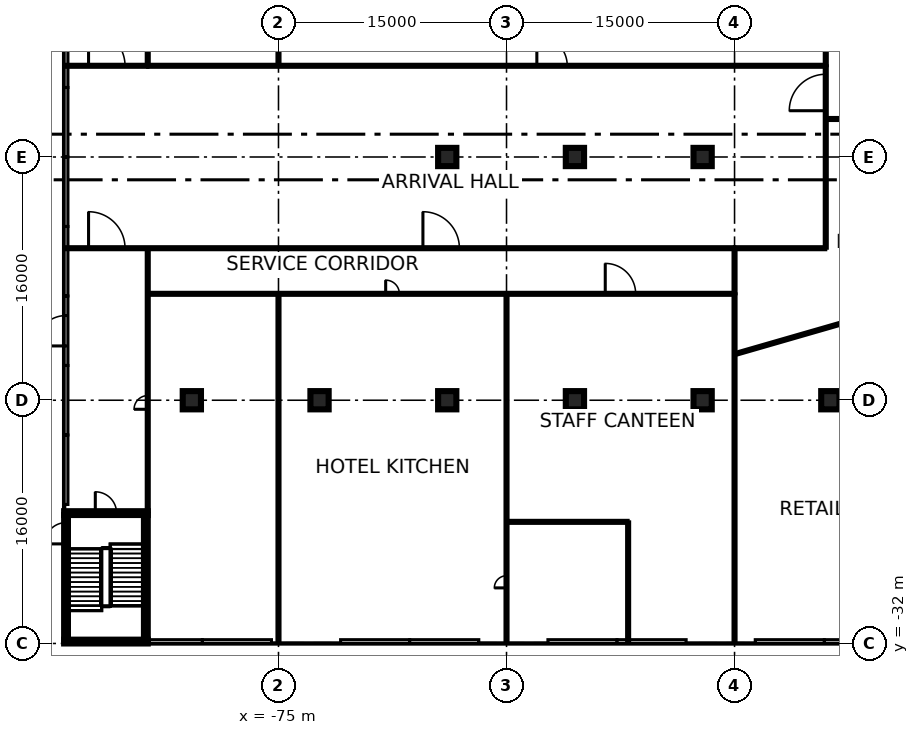
"""IFC4 building model, lengths in metres.
Left out: names, types, materials, properties, quantities, classifications, styles, units other than length and angle.
Written with IfcOpenShell. Run it as: python <this file> out.ifc"""

import sys

from ifc_helpers import new_model, si_unit, direction, frame, frame_2d, origin, origin_2d, place, context, subcontext, project, spatial, rectangle, extrude, element, fill, save


model = new_model("IFC4")
c1 = context("Model", 3, precision=1e-05, world=origin(), true_north=direction((0.0, 1.0)))
c2 = subcontext(c1, "Body", "Model", "MODEL_VIEW")
j1 = project(units=[si_unit("LENGTHUNIT", "METRE"), si_unit("PLANEANGLEUNIT", "RADIAN")], contexts=[c1])
p1 = place(None, origin())
s1 = spatial("IfcSite", under=j1, at=p1, CompositionType="ELEMENT")
p2 = place(p1, origin())
s2 = spatial("IfcBuilding", under=s1, at=p2, CompositionType="ELEMENT")
p3 = place(p2, origin())
s3 = spatial("IfcBuildingStorey", under=s2, at=p3, CompositionType="ELEMENT", Elevation=0.0)
for number, where, z_axis, x_axis in (
    (1, (-80.7, -16.0, -0.45), (0.0, 0.0, 1.0), (1.0, 0.0, 0.0)),
    (2, (-72.3, -16.0, -0.45), (0.0, 0.0, 1.0), (1.0, 0.0, 0.0)),
    (3, (-63.9, -16.0, -0.45), (0.0, 0.0, 1.0), (1.0, 0.0, 0.0)),
    (4, (-63.9, 0.0, -0.45), (0.0, 0.0, 1.0), (1.0, 0.0, 0.0)),
    (5, (-55.5, -16.0, -0.45), (0.0, 0.0, 1.0), (1.0, 0.0, 0.0)),
    (6, (-55.5, 0.0, -0.45), (0.0, 0.0, 1.0), (1.0, 0.0, 0.0)),
    (7, (-47.1, -16.0, -0.45), (0.0, 0.0, 1.0), (1.0, 0.0, 0.0)),
    (8, (-47.1, 0.0, -0.45), (0.0, 0.0, 1.0), (1.0, 0.0, 0.0)),
    (9, (-38.7, -16.0, -0.45), (0.0, 0.0, 1.0), (1.0, 0.0, 0.0)),
):
    element("IfcColumn", number, at=place(p3, frame(where, z_axis=z_axis, x_axis=x_axis)), inside=s3, PredefinedType="COLUMN", context=c2, shape_type="SweptSolid", body=[
        extrude(rectangle(XDim=1.2, YDim=1.2, at=origin_2d()), origin(), (0.0, 0.0, 1.0), 7.55),
    ])
p4 = place(p3, frame((-88.975, 4.572, 0.0), z_axis=(0.0, 0.0, 1.0), x_axis=(0.0, 1.0, 0.0)))
e10 = element("IfcWall", 10, at=p4, inside=s3, PredefinedType="SOLIDWALL", context=c2, shape_type="SweptSolid", body=[
    extrude(rectangle(XDim=4.571, YDim=0.25, at=frame_2d((2.286, 0.0))), origin(), (0.0, 0.0, 1.0), 7.1),
])
for number, where, z_axis, x_axis in (
    (11, (-88.975, 0.0, 0.0), (0.0, 0.0, 1.0), (0.0, 1.0, 0.0)),
    (12, (-88.975, -4.572, 0.0), (0.0, 0.0, 1.0), (0.0, 1.0, 0.0)),
):
    element("IfcWall", number, at=place(p3, frame(where, z_axis=z_axis, x_axis=x_axis)), inside=s3, PredefinedType="SOLIDWALL", context=c2, shape_type="SweptSolid", body=[
        extrude(rectangle(XDim=4.572, YDim=0.25, at=frame_2d((2.286, 0.0))), origin(), (0.0, 0.0, 1.0), 7.1),
    ])
p5 = place(p3, frame((-88.975, -9.143, 0.0), z_axis=(0.0, 0.0, 1.0), x_axis=(0.0, 1.0, 0.0)))
e13 = element("IfcWall", 13, at=p5, inside=s3, PredefinedType="SOLIDWALL", context=c2, shape_type="SweptSolid", body=[
    extrude(rectangle(XDim=4.571, YDim=0.25, at=frame_2d((2.286, 0.0))), origin(), (0.0, 0.0, 1.0), 7.1),
])
p6 = place(p3, frame((-88.975, -13.714, 0.0), z_axis=(0.0, 0.0, 1.0), x_axis=(0.0, 1.0, 0.0)))
e14 = element("IfcWall", 14, at=p6, inside=s3, PredefinedType="SOLIDWALL", context=c2, shape_type="SweptSolid", body=[
    extrude(rectangle(XDim=4.572, YDim=0.25, at=frame_2d((2.286, 0.0))), origin(), (0.0, 0.0, 1.0), 7.1),
])
p7 = place(p6, frame((1.286, 0.0, 0.0)))
e15 = element("IfcOpeningElement", 15, at=p7, cuts=e14, PredefinedType="OPENING", context=c2, shape_type="SweptSolid", body=[
    extrude(rectangle(XDim=2.0, YDim=2.4, at=frame_2d((1.0, 1.2))), frame((0.0, 0.135, 0.0), z_axis=(0.0, -1.0, 0.0), x_axis=(1.0, 0.0, 0.0)), (0.0, 0.0, 1.0), 0.27),
])
p8 = place(p3, frame((-88.975, -18.286, 0.0), z_axis=(0.0, 0.0, 1.0), x_axis=(0.0, 1.0, 0.0)))
e16 = element("IfcWall", 16, at=p8, inside=s3, PredefinedType="SOLIDWALL", context=c2, shape_type="SweptSolid", body=[
    extrude(rectangle(XDim=4.571, YDim=0.25, at=frame_2d((2.286, 0.0))), origin(), (0.0, 0.0, 1.0), 7.1),
])
p9 = place(p3, frame((-88.975, -22.857, 0.0), z_axis=(0.0, 0.0, 1.0), x_axis=(0.0, 1.0, 0.0)))
e17 = element("IfcWall", 17, at=p9, inside=s3, PredefinedType="SOLIDWALL", context=c2, shape_type="SweptSolid", body=[
    extrude(rectangle(XDim=4.572, YDim=0.25, at=frame_2d((2.286, 0.0))), origin(), (0.0, 0.0, 1.0), 7.1),
])
p10 = place(p3, frame((-80.008, -31.875, 0.0), z_axis=(0.0, 0.0, 1.0), x_axis=(-1.0, 0.0, 0.0)))
e18 = element("IfcWall", 18, at=p10, inside=s3, PredefinedType="SOLIDWALL", context=c2, shape_type="SweptSolid", body=[
    extrude(rectangle(XDim=3.592, YDim=0.25, at=frame_2d((1.796, 0.0))), origin(), (0.0, 0.0, 1.0), 7.1),
])
p11 = place(p3, frame((-75.461, -31.875, 0.0), z_axis=(0.0, 0.0, 1.0), x_axis=(-1.0, 0.0, 0.0)))
e19 = element("IfcWall", 19, at=p11, inside=s3, PredefinedType="SOLIDWALL", context=c2, shape_type="SweptSolid", body=[
    extrude(rectangle(XDim=4.546, YDim=0.25, at=frame_2d((2.273, 0.0))), origin(), (0.0, 0.0, 1.0), 7.1),
])
for number, where, z_axis, x_axis in (
    (20, (-66.369, -31.875, 0.0), (0.0, 0.0, 1.0), (-1.0, 0.0, 0.0)),
    (21, (-61.823, -31.875, 0.0), (0.0, 0.0, 1.0), (-1.0, 0.0, 0.0)),
    (22, (-52.731, -31.875, 0.0), (0.0, 0.0, 1.0), (-1.0, 0.0, 0.0)),
    (23, (-48.185, -31.875, 0.0), (0.0, 0.0, 1.0), (-1.0, 0.0, 0.0)),
    (24, (-39.092, -31.875, 0.0), (0.0, 0.0, 1.0), (-1.0, 0.0, 0.0)),
    (25, (-34.546, -31.875, 0.0), (0.0, 0.0, 1.0), (-1.0, 0.0, 0.0)),
):
    element("IfcWall", number, at=place(p3, frame(where, z_axis=z_axis, x_axis=x_axis)), inside=s3, PredefinedType="SOLIDWALL", context=c2, shape_type="SweptSolid", body=[
        extrude(rectangle(XDim=4.546, YDim=0.25, at=frame_2d((2.273, 0.0))), origin(), (0.0, 0.0, 1.0), 7.1),
    ])
p12 = place(p3, frame((-89.1, -31.875, 0.0), z_axis=(0.0, 0.0, 1.0), x_axis=(1.0, 0.0, 0.0)))
e26 = element("IfcWall", 26, at=p12, inside=s3, PredefinedType="SHEAR", context=c2, shape_type="SweptSolid", body=[
    extrude(rectangle(XDim=5.5, YDim=0.25, at=frame_2d((2.75, 0.0))), origin(), (0.0, 0.0, 1.0), 7.1),
])
p13 = place(p3, frame((-89.1, -23.425, 0.0), z_axis=(0.0, 0.0, 1.0), x_axis=(1.0, 0.0, 0.0)))
e27 = element("IfcWall", 27, at=p13, inside=s3, PredefinedType="SHEAR", context=c2, shape_type="SweptSolid", body=[
    extrude(rectangle(XDim=5.5, YDim=0.25, at=frame_2d((2.75, 0.0))), origin(), (0.0, 0.0, 1.0), 7.1),
])
p14 = place(p13, frame((2.05, 0.0, 0.0)))
e28 = element("IfcOpeningElement", 28, at=p14, cuts=e27, PredefinedType="OPENING", context=c2, shape_type="SweptSolid", body=[
    extrude(rectangle(XDim=1.4, YDim=2.1, at=frame_2d((0.7, 1.05))), frame((0.0, 0.135, 0.0), z_axis=(0.0, -1.0, 0.0), x_axis=(1.0, 0.0, 0.0)), (0.0, 0.0, 1.0), 0.27),
])
p15 = place(p3, frame((-88.975, -31.75, 0.0), z_axis=(0.0, 0.0, 1.0), x_axis=(0.0, 1.0, 0.0)))
e29 = element("IfcWall", 29, at=p15, inside=s3, PredefinedType="SHEAR", context=c2, shape_type="SweptSolid", body=[
    extrude(rectangle(XDim=8.2, YDim=0.25, at=frame_2d((4.1, 0.0))), origin(), (0.0, 0.0, 1.0), 7.1),
])
p16 = place(p15, frame((6.3, 0.0, 0.0)))
e30 = element("IfcOpeningElement", 30, at=p16, cuts=e29, PredefinedType="OPENING", context=c2, shape_type="SweptSolid", body=[
    extrude(rectangle(XDim=1.4, YDim=2.1, at=frame_2d((0.7, 1.05))), frame((0.0, 0.135, 0.0), z_axis=(0.0, -1.0, 0.0), x_axis=(1.0, 0.0, 0.0)), (0.0, 0.0, 1.0), 0.27),
])
p17 = place(p3, frame((-83.725, -31.75, 0.0), z_axis=(0.0, 0.0, 1.0), x_axis=(0.0, 1.0, 0.0)))
e31 = element("IfcWall", 31, at=p17, inside=s3, PredefinedType="SHEAR", context=c2, shape_type="SweptSolid", body=[
    extrude(rectangle(XDim=8.2, YDim=0.25, at=frame_2d((4.1, 0.0))), origin(), (0.0, 0.0, 1.0), 7.1),
])
p18 = place(p3, frame((-89.095, -6.0, 0.0), z_axis=(0.0, 0.0, 1.0), x_axis=(1.0, 0.0, 0.0)))
e32 = element("IfcWall", 32, at=p18, inside=s3, PredefinedType="PARTITIONING", context=c2, shape_type="SweptSolid", body=[
    extrude(rectangle(XDim=44.107, YDim=0.2, at=frame_2d((22.053, 0.0))), origin(), (0.0, 0.0, 1.0), 7.1),
])
p19 = place(p18, frame((23.596, 0.0, 0.0)))
e33 = element("IfcOpeningElement", 33, at=p19, cuts=e32, PredefinedType="OPENING", context=c2, shape_type="SweptSolid", body=[
    extrude(rectangle(XDim=2.4, YDim=2.1, at=frame_2d((1.2, 1.05))), frame((0.0, 0.11, 0.0), z_axis=(0.0, -1.0, 0.0), x_axis=(1.0, 0.0, 0.0)), (0.0, 0.0, 1.0), 0.22),
])
p20 = place(p18, frame((1.601, 0.0, 0.0)))
e34 = element("IfcOpeningElement", 34, at=p20, cuts=e32, PredefinedType="OPENING", context=c2, shape_type="SweptSolid", body=[
    extrude(rectangle(XDim=2.4, YDim=2.1, at=frame_2d((1.2, 1.05))), frame((0.0, 0.11, 0.0), z_axis=(0.0, -1.0, 0.0), x_axis=(1.0, 0.0, 0.0)), (0.0, 0.0, 1.0), 0.22),
])
p21 = place(p3, frame((-89.095, 6.0, 0.0), z_axis=(0.0, 0.0, 1.0), x_axis=(1.0, 0.0, 0.0)))
e35 = element("IfcWall", 35, at=p21, inside=s3, PredefinedType="PARTITIONING", context=c2, shape_type="SweptSolid", body=[
    extrude(rectangle(XDim=5.507, YDim=0.2, at=frame_2d((2.753, 0.0))), origin(), (0.0, 0.0, 1.0), 7.1),
])
p22 = place(p21, frame((1.601, 0.0, 0.0)))
e36 = element("IfcOpeningElement", 36, at=p22, cuts=e35, PredefinedType="OPENING", context=c2, shape_type="SweptSolid", body=[
    extrude(rectangle(XDim=2.4, YDim=2.1, at=frame_2d((1.2, 1.05))), frame((0.0, 0.11, 0.0), z_axis=(0.0, -1.0, 0.0), x_axis=(1.0, 0.0, 0.0)), (0.0, 0.0, 1.0), 0.22),
])
p23 = place(p3, frame((-83.6, -23.3, 0.0), z_axis=(0.0, 0.0, 1.0), x_axis=(0.0, 1.0, 0.0)))
e37 = element("IfcWall", 37, at=p23, inside=s3, PredefinedType="PARTITIONING", context=c2, shape_type="SweptSolid", body=[
    extrude(rectangle(XDim=17.298, YDim=0.2, at=frame_2d((8.649, 0.0))), origin(), (0.0, 0.0, 1.0), 7.1),
])
p24 = place(p23, frame((6.705, 0.0, 0.0)))
e38 = element("IfcOpeningElement", 38, at=p24, cuts=e37, PredefinedType="OPENING", context=c2, shape_type="SweptSolid", body=[
    extrude(rectangle(XDim=0.9, YDim=2.1, at=frame_2d((0.45, 1.05))), frame((0.0, 0.11, 0.0), z_axis=(0.0, -1.0, 0.0), x_axis=(1.0, 0.0, 0.0)), (0.0, 0.0, 1.0), 0.22),
])
p25 = place(p3, frame((-83.6, 6.002, 0.0), z_axis=(0.0, 0.0, 1.0), x_axis=(0.0, 1.0, 0.0)))
e39 = element("IfcWall", 39, at=p25, inside=s3, PredefinedType="PARTITIONING", context=c2, shape_type="SweptSolid", body=[
    extrude(rectangle(XDim=17.298, YDim=0.2, at=frame_2d((8.649, 0.0))), origin(), (0.0, 0.0, 1.0), 7.1),
])
p26 = place(p25, frame((7.649, 0.0, 0.0)))
e40 = element("IfcOpeningElement", 40, at=p26, cuts=e39, PredefinedType="OPENING", context=c2, shape_type="SweptSolid", body=[
    extrude(rectangle(XDim=2.0, YDim=2.1, at=frame_2d((1.0, 1.05))), frame((0.0, 0.11, 0.0), z_axis=(0.0, -1.0, 0.0), x_axis=(1.0, 0.0, 0.0)), (0.0, 0.0, 1.0), 0.22),
])
p27 = place(p3, frame((-83.598, -9.0, 0.0), z_axis=(0.0, 0.0, 1.0), x_axis=(1.0, 0.0, 0.0)))
e41 = element("IfcWall", 41, at=p27, inside=s3, PredefinedType="PARTITIONING", context=c2, shape_type="SweptSolid", body=[
    extrude(rectangle(XDim=38.598, YDim=0.2, at=frame_2d((19.299, 0.0))), origin(), (0.0, 0.0, 1.0), 7.1),
])
p28 = place(p27, frame((15.649, 0.0, 0.0)))
e42 = element("IfcOpeningElement", 42, at=p28, cuts=e41, PredefinedType="OPENING", context=c2, shape_type="SweptSolid", body=[
    extrude(rectangle(XDim=0.9, YDim=2.1, at=frame_2d((0.45, 1.05))), frame((0.0, 0.11, 0.0), z_axis=(0.0, -1.0, 0.0), x_axis=(1.0, 0.0, 0.0)), (0.0, 0.0, 1.0), 0.22),
])
p29 = place(p27, frame((30.093, 0.0, 0.0)))
e43 = element("IfcOpeningElement", 43, at=p29, cuts=e41, PredefinedType="OPENING", context=c2, shape_type="SweptSolid", body=[
    extrude(rectangle(XDim=2.0, YDim=2.1, at=frame_2d((1.0, 1.05))), frame((0.0, 0.11, 0.0), z_axis=(0.0, -1.0, 0.0), x_axis=(1.0, 0.0, 0.0)), (0.0, 0.0, 1.0), 0.22),
])
p30 = place(p3, frame((-45.0, -9.0, 0.0), z_axis=(0.0, 0.0, 1.0), x_axis=(0.0, 1.0, 0.0)))
e44 = element("IfcWall", 44, at=p30, inside=s3, PredefinedType="PARTITIONING", context=c2, shape_type="SweptSolid", body=[
    extrude(rectangle(XDim=2.998, YDim=0.2, at=frame_2d((1.499, 0.0))), origin(), (0.0, 0.0, 1.0), 7.1),
])
p31 = place(p3, frame((-83.61, 6.0, 0.0), z_axis=(0.0, 0.0, 1.0), x_axis=(1.0, 0.0, 0.0)))
e45 = element("IfcWall", 45, at=p31, inside=s3, PredefinedType="PARTITIONING", context=c2, shape_type="SweptSolid", body=[
    extrude(rectangle(XDim=44.61, YDim=0.2, at=frame_2d((22.305, 0.0))), origin(), (0.0, 0.0, 1.0), 7.1),
])
p32 = place(p31, frame((25.605, 0.0, 0.0)))
e46 = element("IfcOpeningElement", 46, at=p32, cuts=e45, PredefinedType="OPENING", context=c2, shape_type="SweptSolid", body=[
    extrude(rectangle(XDim=2.0, YDim=2.1, at=frame_2d((1.0, 1.05))), frame((0.0, 0.11, 0.0), z_axis=(0.0, -1.0, 0.0), x_axis=(1.0, 0.0, 0.0)), (0.0, 0.0, 1.0), 0.22),
])
p33 = place(p3, frame((-75.0, -31.995, 0.0), z_axis=(0.0, 0.0, 1.0), x_axis=(0.0, 1.0, 0.0)))
e47 = element("IfcWall", 47, at=p33, inside=s3, PredefinedType="PARTITIONING", context=c2, shape_type="SweptSolid", body=[
    extrude(rectangle(XDim=22.993, YDim=0.2, at=frame_2d((11.497, 0.0))), origin(), (0.0, 0.0, 1.0), 7.1),
])
p34 = place(p3, frame((-75.0, 6.002, 0.0), z_axis=(0.0, 0.0, 1.0), x_axis=(0.0, 1.0, 0.0)))
e48 = element("IfcWall", 48, at=p34, inside=s3, PredefinedType="PARTITIONING", context=c2, shape_type="SweptSolid", body=[
    extrude(rectangle(XDim=25.993, YDim=0.2, at=frame_2d((12.997, 0.0))), origin(), (0.0, 0.0, 1.0), 7.1),
])
p35 = place(p3, frame((-60.0, -31.995, 0.0), z_axis=(0.0, 0.0, 1.0), x_axis=(0.0, 1.0, 0.0)))
e49 = element("IfcWall", 49, at=p35, inside=s3, PredefinedType="PARTITIONING", context=c2, shape_type="SweptSolid", body=[
    extrude(rectangle(XDim=22.993, YDim=0.2, at=frame_2d((11.497, 0.0))), origin(), (0.0, 0.0, 1.0), 7.1),
])
p36 = place(p35, frame((3.651, 0.0, 0.0)))
e50 = element("IfcOpeningElement", 50, at=p36, cuts=e49, PredefinedType="OPENING", context=c2, shape_type="SweptSolid", body=[
    extrude(rectangle(XDim=0.8, YDim=2.1, at=frame_2d((0.4, 1.05))), frame((0.0, 0.11, 0.0), z_axis=(0.0, -1.0, 0.0), x_axis=(1.0, 0.0, 0.0)), (0.0, 0.0, 1.0), 0.22),
])
p37 = place(p3, frame((-59.998, -24.0, 0.0), z_axis=(0.0, 0.0, 1.0), x_axis=(1.0, 0.0, 0.0)))
e51 = element("IfcWall", 51, at=p37, inside=s3, PredefinedType="PARTITIONING", context=c2, shape_type="SweptSolid", body=[
    extrude(rectangle(XDim=7.998, YDim=0.2, at=frame_2d((3.999, 0.0))), origin(), (0.0, 0.0, 1.0), 7.1),
])
p38 = place(p3, frame((-52.0, -31.995, 0.0), z_axis=(0.0, 0.0, 1.0), x_axis=(0.0, 1.0, 0.0)))
e52 = element("IfcWall", 52, at=p38, inside=s3, PredefinedType="PARTITIONING", context=c2, shape_type="SweptSolid", body=[
    extrude(rectangle(XDim=7.995, YDim=0.2, at=frame_2d((3.998, 0.0))), origin(), (0.0, 0.0, 1.0), 7.1),
])
p39 = place(p3, frame((-45.01, -6.0, 0.0), z_axis=(0.0, 0.0, 1.0), x_axis=(1.0, 0.0, 0.0)))
e53 = element("IfcWall", 53, at=p39, inside=s3, PredefinedType="PARTITIONING", context=c2, shape_type="SweptSolid", body=[
    extrude(rectangle(XDim=6.01, YDim=0.2, at=frame_2d((3.005, 0.0))), origin(), (0.0, 0.0, 1.0), 7.1),
])
p40 = place(p3, frame((-45.0, -31.995, 0.0), z_axis=(0.0, 0.0, 1.0), x_axis=(0.0, 1.0, 0.0)))
e54 = element("IfcWall", 54, at=p40, inside=s3, PredefinedType="PARTITIONING", context=c2, shape_type="SweptSolid", body=[
    extrude(rectangle(XDim=22.993, YDim=0.2, at=frame_2d((11.497, 0.0))), origin(), (0.0, 0.0, 1.0), 7.1),
])
p41 = place(p3, frame((-44.998, -12.972, 0.0), z_axis=(0.0, 0.0, 1.0), x_axis=(0.960873245647, 0.27698845788, 0.0)))
e55 = element("IfcWall", 55, at=p41, inside=s3, PredefinedType="PARTITIONING", context=c2, shape_type="SweptSolid", body=[
    extrude(rectangle(XDim=25.676, YDim=0.2, at=frame_2d((12.838, 0.0))), origin(), (0.0, 0.0, 1.0), 4.7),
])
p42 = place(p41, frame((11.946, 0.0, 0.0)))
e56 = element("IfcOpeningElement", 56, at=p42, cuts=e55, PredefinedType="OPENING", context=c2, shape_type="SweptSolid", body=[
    extrude(rectangle(XDim=2.0, YDim=2.1, at=frame_2d((1.0, 1.05))), frame((0.0, 0.11, 0.0), z_axis=(0.0, -1.0, 0.0), x_axis=(1.0, 0.0, 0.0)), (0.0, 0.0, 1.0), 0.22),
])
p43 = place(p3, frame((-39.0, -6.0, 0.0), z_axis=(0.0, 0.0, 1.0), x_axis=(0.0, 1.0, 0.0)))
e57 = element("IfcWall", 57, at=p43, inside=s3, PredefinedType="PARTITIONING", context=c2, shape_type="SweptSolid", body=[
    extrude(rectangle(XDim=12.0, YDim=0.2, at=frame_2d((6.0, 0.0))), origin(), (0.0, 0.0, 1.0), 7.1),
])
p44 = place(p43, frame((9.044, 0.0, 0.0)))
e58 = element("IfcOpeningElement", 58, at=p44, cuts=e57, PredefinedType="OPENING", context=c2, shape_type="SweptSolid", body=[
    extrude(rectangle(XDim=2.4, YDim=2.1, at=frame_2d((1.2, 1.05))), frame((0.0, 0.11, 0.0), z_axis=(0.0, -1.0, 0.0), x_axis=(1.0, 0.0, 0.0)), (0.0, 0.0, 1.0), 0.22),
])
p45 = place(p3, frame((-39.0, 11.397, 0.0), z_axis=(0.0, 0.0, 1.0), x_axis=(0.000181011853, -0.999999983617, 0.0)))
e59 = element("IfcWall", 59, at=p45, inside=s3, PredefinedType="PARTITIONING", context=c2, shape_type="SweptSolid", body=[
    extrude(rectangle(XDim=5.395, YDim=0.2, at=frame_2d((2.698, 0.0))), origin(), (0.0, 0.0, 1.0), 7.1),
])
p46 = place(p3, frame((-38.998, 2.5, 0.0), z_axis=(0.0, 0.0, 1.0), x_axis=(1.0, 0.0, 0.0)))
e60 = element("IfcWall", 60, at=p46, inside=s3, PredefinedType="PARTITIONING", context=c2, shape_type="SweptSolid", body=[
    extrude(rectangle(XDim=13.298, YDim=0.2, at=frame_2d((6.649, 0.0))), origin(), (0.0, 0.0, 1.0), 7.1),
])
p47 = place(p46, frame((6.199, 0.0, 0.0)))
e61 = element("IfcOpeningElement", 61, at=p47, cuts=e60, PredefinedType="OPENING", context=c2, shape_type="SweptSolid", body=[
    extrude(rectangle(XDim=0.9, YDim=2.1, at=frame_2d((0.45, 1.05))), frame((0.0, 0.11, 0.0), z_axis=(0.0, -1.0, 0.0), x_axis=(1.0, 0.0, 0.0)), (0.0, 0.0, 1.0), 0.22),
])
p48 = place(p7, origin())
e62 = element("IfcDoor", 62, at=p48, inside=s3, OperationType="DOUBLE_DOOR_DOUBLE_SWING", PredefinedType="DOOR", context=c2, shape_type="SweptSolid", body=[
    extrude(rectangle(XDim=2.0, YDim=2.4, at=frame_2d((1.0, 1.2))), frame((0.0, 0.025, 0.0), z_axis=(0.0, -1.0, 0.0), x_axis=(1.0, 0.0, 0.0)), (0.0, 0.0, 1.0), 0.05),
])
fill(e15, e62)
p49 = place(p14, origin())
e63 = element("IfcDoor", 63, at=p49, inside=s3, OperationType="SINGLE_SWING_RIGHT", PredefinedType="DOOR", context=c2, shape_type="SweptSolid", body=[
    extrude(rectangle(XDim=1.4, YDim=2.1, at=frame_2d((0.7, 1.05))), frame((0.0, 0.025, 0.0), z_axis=(0.0, -1.0, 0.0), x_axis=(1.0, 0.0, 0.0)), (0.0, 0.0, 1.0), 0.05),
])
fill(e28, e63)
p50 = place(p16, origin())
e64 = element("IfcDoor", 64, at=p50, inside=s3, OperationType="SINGLE_SWING_LEFT", PredefinedType="DOOR", context=c2, shape_type="SweptSolid", body=[
    extrude(rectangle(XDim=1.4, YDim=2.1, at=frame_2d((0.7, 1.05))), frame((0.0, 0.025, 0.0), z_axis=(0.0, -1.0, 0.0), x_axis=(1.0, 0.0, 0.0)), (0.0, 0.0, 1.0), 0.05),
])
fill(e30, e64)
p51 = place(p19, origin())
e65 = element("IfcDoor", 65, at=p51, inside=s3, OperationType="DOUBLE_DOOR_SINGLE_SWING", PredefinedType="DOOR", context=c2, shape_type="SweptSolid", body=[
    extrude(rectangle(XDim=2.4, YDim=2.1, at=frame_2d((1.2, 1.05))), frame((0.0, 0.025, 0.0), z_axis=(0.0, -1.0, 0.0), x_axis=(1.0, 0.0, 0.0)), (0.0, 0.0, 1.0), 0.05),
])
fill(e33, e65)
p52 = place(p22, origin())
e66 = element("IfcDoor", 66, at=p52, inside=s3, OperationType="DOUBLE_DOOR_SINGLE_SWING", PredefinedType="DOOR", context=c2, shape_type="SweptSolid", body=[
    extrude(rectangle(XDim=2.4, YDim=2.1, at=frame_2d((1.2, 1.05))), frame((0.0, 0.025, 0.0), z_axis=(0.0, -1.0, 0.0), x_axis=(1.0, 0.0, 0.0)), (0.0, 0.0, 1.0), 0.05),
])
fill(e36, e66)
p53 = place(p20, frame((2.4, 0.0, 0.0), z_axis=(0.0, 0.0, 1.0), x_axis=(-1.0, 0.0, 0.0)))
e67 = element("IfcDoor", 67, at=p53, inside=s3, OperationType="DOUBLE_DOOR_SINGLE_SWING", PredefinedType="DOOR", context=c2, shape_type="SweptSolid", body=[
    extrude(rectangle(XDim=2.4, YDim=2.1, at=frame_2d((1.2, 1.05))), frame((0.0, 0.025, 0.0), z_axis=(0.0, -1.0, 0.0), x_axis=(1.0, 0.0, 0.0)), (0.0, 0.0, 1.0), 0.05),
])
fill(e34, e67)
p54 = place(p32, origin())
e68 = element("IfcDoor", 68, at=p54, inside=s3, OperationType="DOUBLE_DOOR_SINGLE_SWING", PredefinedType="DOOR", context=c2, shape_type="SweptSolid", body=[
    extrude(rectangle(XDim=2.0, YDim=2.1, at=frame_2d((1.0, 1.05))), frame((0.0, 0.025, 0.0), z_axis=(0.0, -1.0, 0.0), x_axis=(1.0, 0.0, 0.0)), (0.0, 0.0, 1.0), 0.05),
])
fill(e46, e68)
p55 = place(p24, frame((0.9, 0.0, 0.0), z_axis=(0.0, 0.0, 1.0), x_axis=(-1.0, 0.0, 0.0)))
e69 = element("IfcDoor", 69, at=p55, inside=s3, OperationType="SINGLE_SWING_LEFT", PredefinedType="DOOR", context=c2, shape_type="SweptSolid", body=[
    extrude(rectangle(XDim=0.9, YDim=2.1, at=frame_2d((0.45, 1.05))), frame((0.0, 0.025, 0.0), z_axis=(0.0, -1.0, 0.0), x_axis=(1.0, 0.0, 0.0)), (0.0, 0.0, 1.0), 0.05),
])
fill(e38, e69)
p56 = place(p28, frame((0.9, 0.0, 0.0), z_axis=(0.0, 0.0, 1.0), x_axis=(-1.0, 0.0, 0.0)))
e70 = element("IfcDoor", 70, at=p56, inside=s3, OperationType="SINGLE_SWING_LEFT", PredefinedType="DOOR", context=c2, shape_type="SweptSolid", body=[
    extrude(rectangle(XDim=0.9, YDim=2.1, at=frame_2d((0.45, 1.05))), frame((0.0, 0.025, 0.0), z_axis=(0.0, -1.0, 0.0), x_axis=(1.0, 0.0, 0.0)), (0.0, 0.0, 1.0), 0.05),
])
fill(e42, e70)
p57 = place(p36, frame((0.8, 0.0, 0.0), z_axis=(0.0, 0.0, 1.0), x_axis=(-1.0, 0.0, 0.0)))
e71 = element("IfcDoor", 71, at=p57, inside=s3, OperationType="SINGLE_SWING_LEFT", PredefinedType="DOOR", context=c2, shape_type="SweptSolid", body=[
    extrude(rectangle(XDim=0.8, YDim=2.1, at=frame_2d((0.4, 1.05))), frame((0.0, 0.025, 0.0), z_axis=(0.0, -1.0, 0.0), x_axis=(1.0, 0.0, 0.0)), (0.0, 0.0, 1.0), 0.05),
])
fill(e50, e71)
p58 = place(p29, frame((2.0, 0.0, 0.0), z_axis=(0.0, 0.0, 1.0), x_axis=(-1.0, 0.0, 0.0)))
e72 = element("IfcDoor", 72, at=p58, inside=s3, OperationType="DOUBLE_DOOR_SINGLE_SWING", PredefinedType="DOOR", context=c2, shape_type="SweptSolid", body=[
    extrude(rectangle(XDim=2.0, YDim=2.1, at=frame_2d((1.0, 1.05))), frame((0.0, 0.025, 0.0), z_axis=(0.0, -1.0, 0.0), x_axis=(1.0, 0.0, 0.0)), (0.0, 0.0, 1.0), 0.05),
])
fill(e43, e72)
p59 = place(p44, origin())
e73 = element("IfcDoor", 73, at=p59, inside=s3, OperationType="DOUBLE_DOOR_SINGLE_SWING", PredefinedType="DOOR", context=c2, shape_type="SweptSolid", body=[
    extrude(rectangle(XDim=2.4, YDim=2.1, at=frame_2d((1.2, 1.05))), frame((0.0, 0.025, 0.0), z_axis=(0.0, -1.0, 0.0), x_axis=(1.0, 0.0, 0.0)), (0.0, 0.0, 1.0), 0.05),
])
fill(e58, e73)
save(model, sys.argv[1])
